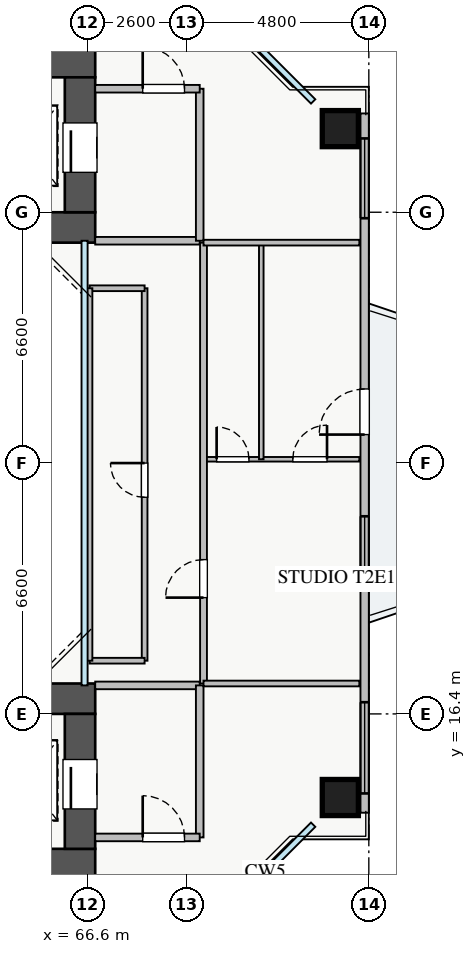
"""IFC4 building model, lengths in metres.
Left out: names, types, materials, properties, quantities, classifications, styles, units other than length and angle.
Written with IfcOpenShell. Run it as: python <this file> out.ifc"""

import sys

from ifc_helpers import new_model, si_unit, direction, frame, frame_2d, origin, origin_2d, place, context, subcontext, project, spatial, rectangle, extrude, source, transform, mapped, element, fill, save


model = new_model("IFC4")
c1 = context("Model", 3, precision=1e-05, world=origin(), true_north=direction((0.0, 1.0)))
c2 = subcontext(c1, "Body", "Model", "MODEL_VIEW")
j1 = project(units=[si_unit("LENGTHUNIT", "METRE"), si_unit("PLANEANGLEUNIT", "RADIAN")], contexts=[c1])
p1 = place(None, origin())
s1 = spatial("IfcSite", under=j1, at=p1, CompositionType="ELEMENT")
p2 = place(p1, origin())
s2 = spatial("IfcBuilding", under=s1, at=p2, CompositionType="ELEMENT")
p3 = place(p2, frame((0.0, 0.0, 60.0)))
s3 = spatial("IfcBuildingStorey", under=s2, at=p3, CompositionType="ELEMENT", Elevation=60.0)
p4 = place(p3, frame((54.2, 29.2, 0.0), z_axis=(0.0, 0.0, 1.0), x_axis=(1.0, 0.0, 0.0)))
e1 = element("IfcWall", 1, at=p4, inside=s3, PredefinedType="SHEAR", context=c2, shape_type="SweptSolid", body=[
    extrude(rectangle(XDim=12.6, YDim=0.8, at=frame_2d((6.3, 0.0))), origin(), (0.0, 0.0, 1.0), 3.25),
])
p5 = place(p3, frame((54.2, 33.55, 0.0), z_axis=(0.0, 0.0, 1.0), x_axis=(1.0, 0.0, 0.0)))
e2 = element("IfcWall", 2, at=p5, inside=s3, PredefinedType="SHEAR", context=c2, shape_type="SweptSolid", body=[
    extrude(rectangle(XDim=12.6, YDim=0.8, at=frame_2d((6.3, 0.0))), origin(), (0.0, 0.0, 1.0), 3.25),
])
p6 = place(p5, frame((8.2, 0.0, 0.0)))
e3 = element("IfcOpeningElement", 3, at=p6, cuts=e2, PredefinedType="OPENING", context=c2, shape_type="SweptSolid", body=[
    extrude(rectangle(XDim=1.1, YDim=2.05, at=frame_2d((0.55, 1.025))), frame((0.0, 0.41, 0.0), z_axis=(0.0, -1.0, 0.0), x_axis=(1.0, 0.0, 0.0)), (0.0, 0.0, 1.0), 0.82),
])
p7 = place(p3, frame((66.4, 29.6, 0.0), z_axis=(0.0, 0.0, 1.0), x_axis=(0.0, 1.0, 0.0)))
e4 = element("IfcWall", 4, at=p7, inside=s3, PredefinedType="SHEAR", context=c2, shape_type="SweptSolid", body=[
    extrude(rectangle(XDim=3.55, YDim=0.8, at=frame_2d((1.775, 0.0))), origin(), (0.0, 0.0, 1.0), 3.25),
])
p8 = place(p7, frame((1.05, 0.0, 0.0)))
e5 = element("IfcOpeningElement", 5, at=p8, cuts=e4, PredefinedType="OPENING", context=c2, shape_type="SweptSolid", body=[
    extrude(rectangle(XDim=1.3, YDim=2.05, at=frame_2d((0.65, 1.025))), frame((0.0, 0.41, 0.0), z_axis=(0.0, -1.0, 0.0), x_axis=(1.0, 0.0, 0.0)), (0.0, 0.0, 1.0), 0.82),
])
p9 = place(p3, frame((54.2, 12.45, 0.0), z_axis=(0.0, 0.0, 1.0), x_axis=(1.0, 0.0, 0.0)))
e6 = element("IfcWall", 6, at=p9, inside=s3, PredefinedType="SHEAR", context=c2, shape_type="SweptSolid", body=[
    extrude(rectangle(XDim=12.6, YDim=0.8, at=frame_2d((6.3, 0.0))), origin(), (0.0, 0.0, 1.0), 3.25),
])
p10 = place(p9, frame((8.2, 0.0, 0.0)))
e7 = element("IfcOpeningElement", 7, at=p10, cuts=e6, PredefinedType="OPENING", context=c2, shape_type="SweptSolid", body=[
    extrude(rectangle(XDim=1.1, YDim=2.05, at=frame_2d((0.55, 1.025))), frame((0.0, 0.41, 0.0), z_axis=(0.0, -1.0, 0.0), x_axis=(1.0, 0.0, 0.0)), (0.0, 0.0, 1.0), 0.82),
])
p11 = place(p3, frame((54.2, 16.8, 0.0), z_axis=(0.0, 0.0, 1.0), x_axis=(1.0, 0.0, 0.0)))
e8 = element("IfcWall", 8, at=p11, inside=s3, PredefinedType="SHEAR", context=c2, shape_type="SweptSolid", body=[
    extrude(rectangle(XDim=12.6, YDim=0.8, at=frame_2d((6.3, 0.0))), origin(), (0.0, 0.0, 1.0), 3.25),
])
p12 = place(p3, frame((66.4, 12.85, 0.0), z_axis=(0.0, 0.0, 1.0), x_axis=(0.0, 1.0, 0.0)))
e9 = element("IfcWall", 9, at=p12, inside=s3, PredefinedType="SHEAR", context=c2, shape_type="SweptSolid", body=[
    extrude(rectangle(XDim=3.55, YDim=0.8, at=frame_2d((1.775, 0.0))), origin(), (0.0, 0.0, 1.0), 3.25),
])
p13 = place(p12, frame((1.05, 0.0, 0.0)))
e10 = element("IfcOpeningElement", 10, at=p13, cuts=e9, PredefinedType="OPENING", context=c2, shape_type="SweptSolid", body=[
    extrude(rectangle(XDim=1.3, YDim=2.05, at=frame_2d((0.65, 1.025))), frame((0.0, 0.41, 0.0), z_axis=(0.0, -1.0, 0.0), x_axis=(1.0, 0.0, 0.0)), (0.0, 0.0, 1.0), 0.82),
])
m1 = source(origin(), c2, "Body", "SweptSolid", [
    extrude(rectangle(XDim=0.95, YDim=0.95, at=origin_2d()), origin(), (0.0, 0.0, 1.0), 3.25),
])
for number, where, z_axis, x_axis in (
    (11, (73.25, 14.2, 0.0), (0.0, 0.0, 1.0), (1.0, 0.0, 0.0)),
    (12, (73.25, 31.8, 0.0), (0.0, 0.0, 1.0), (1.0, 0.0, 0.0)),
):
    element("IfcColumn", number, at=place(p3, frame(where, z_axis=z_axis, x_axis=x_axis)), inside=s3, PredefinedType="COLUMN", context=c2, shape_type="MappedRepresentation", body=[
        mapped(m1, transform((0.0, 0.0, 0.0), x_axis=(1.0, 0.0, 0.0), y_axis=(0.0, 1.0, 0.0), z_axis=(0.0, 0.0, 1.0), scale=1.0)),
    ])
p14 = place(p3, frame((73.89, 13.8, 0.0), z_axis=(0.0, 0.0, 1.0), x_axis=(0.0, 1.0, 0.0)))
e13 = element("IfcWall", 13, at=p14, inside=s3, PredefinedType="STANDARD", context=c2, shape_type="SweptSolid", body=[
    extrude(rectangle(XDim=18.4, YDim=0.22, at=frame_2d((9.2, 0.0))), origin(), (0.0, 0.0, 1.0), 2.61),
])
p15 = place(p14, frame((9.95, 0.0, 0.0)))
e14 = element("IfcOpeningElement", 14, at=p15, cuts=e13, PredefinedType="OPENING", context=c2, shape_type="SweptSolid", body=[
    extrude(rectangle(XDim=1.2, YDim=2.1, at=frame_2d((0.6, 1.05))), frame((0.0, 0.12, 0.0), z_axis=(0.0, -1.0, 0.0), x_axis=(1.0, 0.0, 0.0)), (0.0, 0.0, 1.0), 0.24),
])
p16 = place(p14, frame((0.508, 0.0, 0.9)))
e15 = element("IfcOpeningElement", 15, at=p16, cuts=e13, PredefinedType="OPENING", context=c2, shape_type="SweptSolid", body=[
    extrude(rectangle(XDim=2.4, YDim=1.5, at=frame_2d((1.2, 0.75))), frame((0.0, 0.12, 0.0), z_axis=(0.0, -1.0, 0.0), x_axis=(1.0, 0.0, 0.0)), (0.0, 0.0, 1.0), 0.24),
])
p17 = place(p14, frame((6.0, 0.0, 0.9)))
e16 = element("IfcOpeningElement", 16, at=p17, cuts=e13, PredefinedType="OPENING", context=c2, shape_type="SweptSolid", body=[
    extrude(rectangle(XDim=1.8, YDim=1.45, at=frame_2d((0.9, 0.725))), frame((0.0, 0.12, 0.0), z_axis=(0.0, -1.0, 0.0), x_axis=(1.0, 0.0, 0.0)), (0.0, 0.0, 1.0), 0.24),
])
p18 = place(p14, frame((15.643, 0.0, 0.9)))
e17 = element("IfcOpeningElement", 17, at=p18, cuts=e13, PredefinedType="OPENING", context=c2, shape_type="SweptSolid", body=[
    extrude(rectangle(XDim=2.1, YDim=1.5, at=frame_2d((1.05, 0.75))), frame((0.0, 0.12, 0.0), z_axis=(0.0, -1.0, 0.0), x_axis=(1.0, 0.0, 0.0)), (0.0, 0.0, 1.0), 0.24),
])
p19 = place(p3, frame((66.8, 28.85, 0.0), z_axis=(0.0, 0.0, 1.0), x_axis=(1.0, 0.0, 0.0)))
e18 = element("IfcWall", 18, at=p19, inside=s3, PredefinedType="PARTITIONING", context=c2, shape_type="SweptSolid", body=[
    extrude(rectangle(XDim=2.75, YDim=0.2, at=frame_2d((1.375, 0.0))), origin(), (0.0, 0.0, 1.0), 3.07),
])
p20 = place(p3, frame((69.55, 28.85, 0.0), z_axis=(0.0, 0.0, 1.0), x_axis=(0.0, 1.0, 0.0)))
e19 = element("IfcWall", 19, at=p20, inside=s3, PredefinedType="PARTITIONING", context=c2, shape_type="SweptSolid", body=[
    extrude(rectangle(XDim=4.0, YDim=0.2, at=frame_2d((2.0, 0.0))), origin(), (0.0, 0.0, 1.0), 2.615),
])
p21 = place(p3, frame((66.8, 32.85, 0.0), z_axis=(0.0, 0.0, 1.0), x_axis=(1.0, 0.0, 0.0)))
e20 = element("IfcWall", 20, at=p21, inside=s3, PredefinedType="PARTITIONING", context=c2, shape_type="SweptSolid", body=[
    extrude(rectangle(XDim=2.75, YDim=0.2, at=frame_2d((1.375, 0.0))), origin(), (0.0, 0.0, 1.0), 3.07),
])
p22 = place(p21, frame((1.25, 0.0, 0.0)))
e21 = element("IfcOpeningElement", 21, at=p22, cuts=e20, PredefinedType="OPENING", context=c2, shape_type="SweptSolid", body=[
    extrude(rectangle(XDim=1.1, YDim=2.05, at=frame_2d((0.55, 1.025))), frame((0.0, 0.11, 0.0), z_axis=(0.0, -1.0, 0.0), x_axis=(1.0, 0.0, 0.0)), (0.0, 0.0, 1.0), 0.22),
])
p23 = place(p3, frame((66.8, 17.15, 0.0), z_axis=(0.0, 0.0, 1.0), x_axis=(1.0, 0.0, 0.0)))
e22 = element("IfcWall", 22, at=p23, inside=s3, PredefinedType="PARTITIONING", context=c2, shape_type="SweptSolid", body=[
    extrude(rectangle(XDim=2.75, YDim=0.2, at=frame_2d((1.375, 0.0))), origin(), (0.0, 0.0, 1.0), 3.07),
])
p24 = place(p3, frame((69.55, 13.15, 0.0), z_axis=(0.0, 0.0, 1.0), x_axis=(0.0, 1.0, 0.0)))
e23 = element("IfcWall", 23, at=p24, inside=s3, PredefinedType="PARTITIONING", context=c2, shape_type="SweptSolid", body=[
    extrude(rectangle(XDim=4.0, YDim=0.2, at=frame_2d((2.0, 0.0))), origin(), (0.0, 0.0, 1.0), 2.615),
])
p25 = place(p3, frame((66.8, 13.15, 0.0), z_axis=(0.0, 0.0, 1.0), x_axis=(1.0, 0.0, 0.0)))
e24 = element("IfcWall", 24, at=p25, inside=s3, PredefinedType="PARTITIONING", context=c2, shape_type="SweptSolid", body=[
    extrude(rectangle(XDim=2.75, YDim=0.2, at=frame_2d((1.375, 0.0))), origin(), (0.0, 0.0, 1.0), 3.07),
])
p26 = place(p25, frame((1.25, 0.0, 0.0)))
e25 = element("IfcOpeningElement", 25, at=p26, cuts=e24, PredefinedType="OPENING", context=c2, shape_type="SweptSolid", body=[
    extrude(rectangle(XDim=1.1, YDim=2.05, at=frame_2d((0.55, 1.025))), frame((0.0, 0.11, 0.0), z_axis=(0.0, -1.0, 0.0), x_axis=(1.0, 0.0, 0.0)), (0.0, 0.0, 1.0), 0.22),
])
p27 = place(p3, frame((69.65, 23.1, 0.0), z_axis=(0.0, 0.0, 1.0), x_axis=(1.0, 0.0, 0.0)))
e26 = element("IfcWall", 26, at=p27, inside=s3, PredefinedType="PLUMBINGWALL", context=c2, shape_type="SweptSolid", body=[
    extrude(rectangle(XDim=4.1, YDim=0.12, at=frame_2d((2.05, 0.0))), origin(), (0.0, 0.0, 1.0), 2.765),
])
p28 = place(p27, frame((0.345, 0.0, 0.0)))
e27 = element("IfcOpeningElement", 27, at=p28, cuts=e26, PredefinedType="OPENING", context=c2, shape_type="SweptSolid", body=[
    extrude(rectangle(XDim=0.85, YDim=2.05, at=frame_2d((0.425, 1.025))), frame((0.0, 0.07, 0.0), z_axis=(0.0, -1.0, 0.0), x_axis=(1.0, 0.0, 0.0)), (0.0, 0.0, 1.0), 0.14),
])
p29 = place(p27, frame((2.35, 0.0, 0.0)))
e28 = element("IfcOpeningElement", 28, at=p29, cuts=e26, PredefinedType="OPENING", context=c2, shape_type="SweptSolid", body=[
    extrude(rectangle(XDim=0.9, YDim=2.05, at=frame_2d((0.45, 1.025))), frame((0.0, 0.07, 0.0), z_axis=(0.0, -1.0, 0.0), x_axis=(1.0, 0.0, 0.0)), (0.0, 0.0, 1.0), 0.14),
])
p30 = place(p3, frame((71.17, 23.1, 0.0), z_axis=(0.0, 0.0, 1.0), x_axis=(0.0, 1.0, 0.0)))
e29 = element("IfcWall", 29, at=p30, inside=s3, PredefinedType="PLUMBINGWALL", context=c2, shape_type="SweptSolid", body=[
    extrude(rectangle(XDim=5.7, YDim=0.12, at=frame_2d((2.85, 0.0))), origin(), (0.0, 0.0, 1.0), 3.07),
])
p31 = place(p3, frame((69.65, 17.2, 0.0), z_axis=(0.0, 0.0, 1.0), x_axis=(0.0, 1.0, 0.0)))
e30 = element("IfcWall", 30, at=p31, inside=s3, PredefinedType="PARTITIONING", context=c2, shape_type="SweptSolid", body=[
    extrude(rectangle(XDim=11.6, YDim=0.18, at=frame_2d((5.8, 0.0))), origin(), (0.0, 0.0, 1.0), 3.07),
])
p32 = place(p31, frame((2.26, 0.0, 0.0)))
e31 = element("IfcOpeningElement", 31, at=p32, cuts=e30, PredefinedType="OPENING", context=c2, shape_type="SweptSolid", body=[
    extrude(rectangle(XDim=1.0, YDim=2.05, at=frame_2d((0.5, 1.025))), frame((0.0, 0.1, 0.0), z_axis=(0.0, -1.0, 0.0), x_axis=(1.0, 0.0, 0.0)), (0.0, 0.0, 1.0), 0.2),
])
for number, where, z_axis, x_axis in (
    (32, (69.65, 17.2, 0.0), (0.0, 0.0, 1.0), (1.0, 0.0, 0.0)),
    (33, (69.65, 28.8, 0.0), (0.0, 0.0, 1.0), (1.0, 0.0, 0.0)),
):
    element("IfcWall", number, at=place(p3, frame(where, z_axis=z_axis, x_axis=x_axis)), inside=s3, PredefinedType="PARTITIONING", context=c2, shape_type="SweptSolid", body=[
        extrude(rectangle(XDim=4.1, YDim=0.15, at=frame_2d((2.05, 0.0))), origin(), (0.0, 0.0, 1.0), 3.07),
    ])
p33 = place(p3, frame((68.1, 17.8, 0.0), z_axis=(0.0, 0.0, 1.0), x_axis=(0.0, 1.0, 0.0)))
e34 = element("IfcWall", 34, at=p33, inside=s3, PredefinedType="PARTITIONING", context=c2, shape_type="SweptSolid", body=[
    extrude(rectangle(XDim=9.8, YDim=0.15, at=frame_2d((4.9, 0.0))), origin(), (0.0, 0.0, 1.0), 3.07),
])
p34 = place(p33, frame((4.3, 0.0, 0.0)))
e35 = element("IfcOpeningElement", 35, at=p34, cuts=e34, PredefinedType="OPENING", context=c2, shape_type="SweptSolid", body=[
    extrude(rectangle(XDim=0.9, YDim=2.05, at=frame_2d((0.45, 1.025))), frame((0.0, 0.085, 0.0), z_axis=(0.0, -1.0, 0.0), x_axis=(1.0, 0.0, 0.0)), (0.0, 0.0, 1.0), 0.17),
])
p35 = place(p3, frame((66.65, 27.6, 0.0), z_axis=(0.0, 0.0, 1.0), x_axis=(1.0, 0.0, 0.0)))
e36 = element("IfcWall", 36, at=p35, inside=s3, PredefinedType="PARTITIONING", context=c2, shape_type="SweptSolid", body=[
    extrude(rectangle(XDim=1.45, YDim=0.15, at=frame_2d((0.725, 0.0))), origin(), (0.0, 0.0, 1.0), 2.765),
])
p36 = place(p3, frame((66.65, 17.8, 0.0), z_axis=(0.0, 0.0, 1.0), x_axis=(1.0, 0.0, 0.0)))
e37 = element("IfcWall", 37, at=p36, inside=s3, PredefinedType="PARTITIONING", context=c2, shape_type="SweptSolid", body=[
    extrude(rectangle(XDim=1.45, YDim=0.15, at=frame_2d((0.725, 0.0))), origin(), (0.0, 0.0, 1.0), 3.07),
])
p37 = place(p3, frame((66.65, 17.8, 0.0), z_axis=(0.0, 0.0, 1.0), x_axis=(0.0, 1.0, 0.0)))
e38 = element("IfcWall", 38, at=p37, inside=s3, PredefinedType="PARTITIONING", context=c2, shape_type="SweptSolid", body=[
    extrude(rectangle(XDim=9.8, YDim=0.15, at=frame_2d((4.9, 0.0))), origin(), (0.0, 0.0, 1.0), 2.665),
])
m2 = source(origin(), c2, "Body", "SweptSolid", [
    extrude(rectangle(XDim=1.2, YDim=2.1, at=frame_2d((0.6, 1.05))), frame((0.0, 0.025, 0.0), z_axis=(0.0, -1.0, 0.0), x_axis=(1.0, 0.0, 0.0)), (0.0, 0.0, 1.0), 0.05),
])
p38 = place(p15, origin())
e39 = element("IfcDoor", 39, at=p38, inside=s3, OperationType="SINGLE_SWING_LEFT", PredefinedType="DOOR", context=c2, shape_type="MappedRepresentation", body=[
    mapped(m2, transform((0.0, 0.0, 0.0), x_axis=(1.0, 0.0, 0.0), y_axis=(0.0, 1.0, 0.0), z_axis=(0.0, 0.0, 1.0), scale=1.0)),
])
fill(e14, e39)
m3 = source(origin(), c2, "Body", "SweptSolid", [
    extrude(rectangle(XDim=2.4, YDim=1.5, at=frame_2d((1.2, 0.75))), frame((0.0, 0.03, 0.0), z_axis=(0.0, -1.0, 0.0), x_axis=(1.0, 0.0, 0.0)), (0.0, 0.0, 1.0), 0.06),
])
p39 = place(p16, origin())
e40 = element("IfcWindow", 40, at=p39, inside=s3, PartitioningType="TRIPLE_PANEL_VERTICAL", PredefinedType="WINDOW", context=c2, shape_type="MappedRepresentation", body=[
    mapped(m3, transform((0.0, 0.0, 0.0), x_axis=(1.0, 0.0, 0.0), y_axis=(0.0, 1.0, 0.0), z_axis=(0.0, 0.0, 1.0), scale=1.0)),
])
fill(e15, e40)
m4 = source(origin(), c2, "Body", "SweptSolid", [
    extrude(rectangle(XDim=1.8, YDim=1.45, at=frame_2d((0.9, 0.725))), frame((0.0, 0.03, 0.0), z_axis=(0.0, -1.0, 0.0), x_axis=(1.0, 0.0, 0.0)), (0.0, 0.0, 1.0), 0.06),
])
p40 = place(p17, origin())
e41 = element("IfcWindow", 41, at=p40, inside=s3, PartitioningType="DOUBLE_PANEL_VERTICAL", PredefinedType="WINDOW", context=c2, shape_type="MappedRepresentation", body=[
    mapped(m4, transform((0.0, 0.0, 0.0), x_axis=(1.0, 0.0, 0.0), y_axis=(0.0, 1.0, 0.0), z_axis=(0.0, 0.0, 1.0), scale=1.0)),
])
fill(e16, e41)
m5 = source(origin(), c2, "Body", "SweptSolid", [
    extrude(rectangle(XDim=2.1, YDim=1.5, at=frame_2d((1.05, 0.75))), frame((0.0, 0.03, 0.0), z_axis=(0.0, -1.0, 0.0), x_axis=(1.0, 0.0, 0.0)), (0.0, 0.0, 1.0), 0.06),
])
p41 = place(p18, origin())
e42 = element("IfcWindow", 42, at=p41, inside=s3, PartitioningType="TRIPLE_PANEL_VERTICAL", PredefinedType="WINDOW", context=c2, shape_type="MappedRepresentation", body=[
    mapped(m5, transform((0.0, 0.0, 0.0), x_axis=(1.0, 0.0, 0.0), y_axis=(0.0, 1.0, 0.0), z_axis=(0.0, 0.0, 1.0), scale=1.0)),
])
fill(e17, e42)
m6 = source(origin(), c2, "Body", "SweptSolid", [
    extrude(rectangle(XDim=1.3, YDim=2.05, at=frame_2d((0.65, 1.025))), frame((0.0, 0.025, 0.0), z_axis=(0.0, -1.0, 0.0), x_axis=(1.0, 0.0, 0.0)), (0.0, 0.0, 1.0), 0.05),
])
p42 = place(p8, origin())
e43 = element("IfcDoor", 43, at=p42, inside=s3, OperationType="SLIDING_TO_LEFT", PredefinedType="DOOR", context=c2, shape_type="MappedRepresentation", body=[
    mapped(m6, transform((0.0, 0.0, 0.0), x_axis=(1.0, 0.0, 0.0), y_axis=(0.0, 1.0, 0.0), z_axis=(0.0, 0.0, 1.0), scale=1.0)),
])
fill(e5, e43)
p43 = place(p13, origin())
e44 = element("IfcDoor", 44, at=p43, inside=s3, OperationType="SLIDING_TO_RIGHT", PredefinedType="DOOR", context=c2, shape_type="MappedRepresentation", body=[
    mapped(m6, transform((0.0, 0.0, 0.0), x_axis=(1.0, 0.0, 0.0), y_axis=(0.0, 1.0, 0.0), z_axis=(0.0, 0.0, 1.0), scale=1.0)),
])
fill(e10, e44)
m7 = source(origin(), c2, "Body", "SweptSolid", [
    extrude(rectangle(XDim=1.1, YDim=2.05, at=frame_2d((0.55, 1.025))), frame((0.0, 0.025, 0.0), z_axis=(0.0, -1.0, 0.0), x_axis=(1.0, 0.0, 0.0)), (0.0, 0.0, 1.0), 0.05),
])
p44 = place(p22, origin())
e45 = element("IfcDoor", 45, at=p44, inside=s3, OperationType="SINGLE_SWING_LEFT", PredefinedType="DOOR", context=c2, shape_type="MappedRepresentation", body=[
    mapped(m7, transform((0.0, 0.0, 0.0), x_axis=(1.0, 0.0, 0.0), y_axis=(0.0, 1.0, 0.0), z_axis=(0.0, 0.0, 1.0), scale=1.0)),
])
fill(e21, e45)
p45 = place(p26, origin())
e46 = element("IfcDoor", 46, at=p45, inside=s3, OperationType="SINGLE_SWING_LEFT", PredefinedType="DOOR", context=c2, shape_type="MappedRepresentation", body=[
    mapped(m7, transform((0.0, 0.0, 0.0), x_axis=(1.0, 0.0, 0.0), y_axis=(0.0, 1.0, 0.0), z_axis=(0.0, 0.0, 1.0), scale=1.0)),
])
fill(e25, e46)
m8 = source(origin(), c2, "Body", "SweptSolid", [
    extrude(rectangle(XDim=0.85, YDim=2.05, at=frame_2d((0.425, 1.025))), frame((0.0, 0.025, 0.0), z_axis=(0.0, -1.0, 0.0), x_axis=(1.0, 0.0, 0.0)), (0.0, 0.0, 1.0), 0.05),
])
p46 = place(p28, origin())
e47 = element("IfcDoor", 47, at=p46, inside=s3, OperationType="SINGLE_SWING_LEFT", PredefinedType="DOOR", context=c2, shape_type="MappedRepresentation", body=[
    mapped(m8, transform((0.0, 0.0, 0.0), x_axis=(1.0, 0.0, 0.0), y_axis=(0.0, 1.0, 0.0), z_axis=(0.0, 0.0, 1.0), scale=1.0)),
])
fill(e27, e47)
m9 = source(origin(), c2, "Body", "SweptSolid", [
    extrude(rectangle(XDim=0.9, YDim=2.05, at=frame_2d((0.45, 1.025))), frame((0.0, 0.025, 0.0), z_axis=(0.0, -1.0, 0.0), x_axis=(1.0, 0.0, 0.0)), (0.0, 0.0, 1.0), 0.05),
])
p47 = place(p29, origin())
e48 = element("IfcDoor", 48, at=p47, inside=s3, OperationType="SINGLE_SWING_RIGHT", PredefinedType="DOOR", context=c2, shape_type="MappedRepresentation", body=[
    mapped(m9, transform((0.0, 0.0, 0.0), x_axis=(1.0, 0.0, 0.0), y_axis=(0.0, 1.0, 0.0), z_axis=(0.0, 0.0, 1.0), scale=1.0)),
])
fill(e28, e48)
m10 = source(origin(), c2, "Body", "SweptSolid", [
    extrude(rectangle(XDim=1.0, YDim=2.05, at=frame_2d((0.5, 1.025))), frame((0.0, 0.025, 0.0), z_axis=(0.0, -1.0, 0.0), x_axis=(1.0, 0.0, 0.0)), (0.0, 0.0, 1.0), 0.05),
])
p48 = place(p32, origin())
e49 = element("IfcDoor", 49, at=p48, inside=s3, OperationType="SINGLE_SWING_LEFT", PredefinedType="DOOR", context=c2, shape_type="MappedRepresentation", body=[
    mapped(m10, transform((0.0, 0.0, 0.0), x_axis=(1.0, 0.0, 0.0), y_axis=(0.0, 1.0, 0.0), z_axis=(0.0, 0.0, 1.0), scale=1.0)),
])
fill(e31, e49)
p49 = place(p34, origin())
e50 = element("IfcDoor", 50, at=p49, inside=s3, OperationType="SINGLE_SWING_RIGHT", PredefinedType="DOOR", context=c2, shape_type="MappedRepresentation", body=[
    mapped(m9, transform((0.0, 0.0, 0.0), x_axis=(1.0, 0.0, 0.0), y_axis=(0.0, 1.0, 0.0), z_axis=(0.0, 0.0, 1.0), scale=1.0)),
])
fill(e35, e50)
save(model, sys.argv[1])
